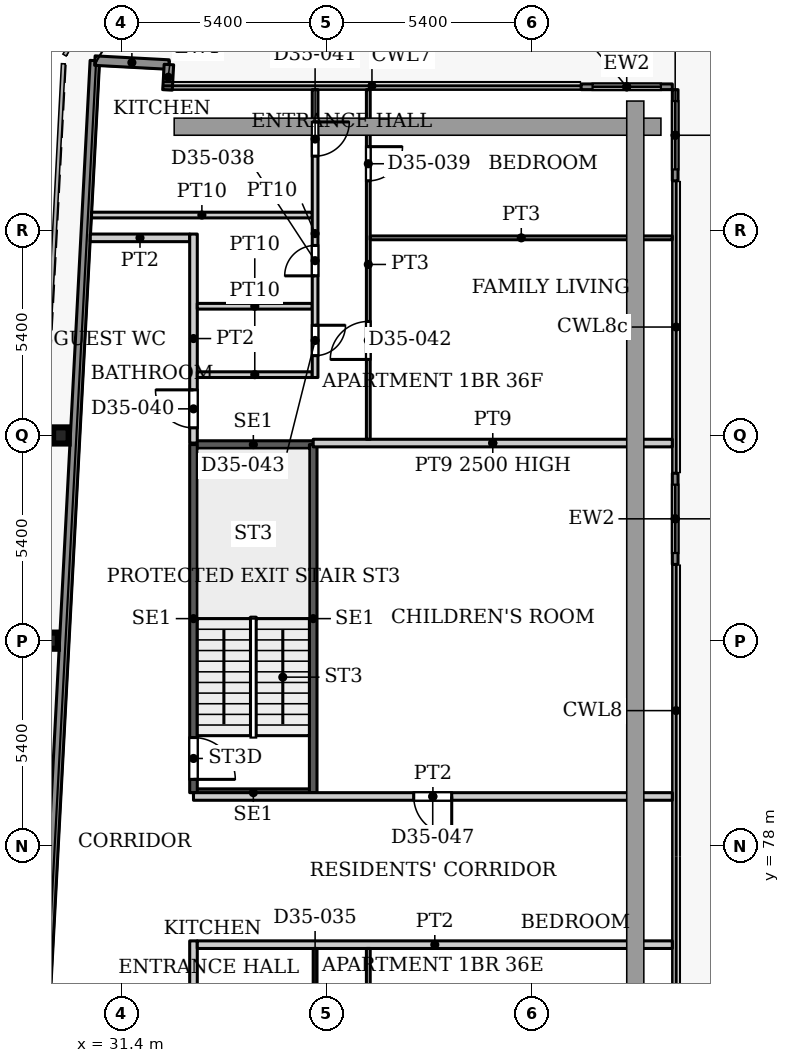
"""IFC4 building model, lengths in metres.
Left out: names, types, materials, properties, quantities, classifications, styles, units other than length and angle.
Written with IfcOpenShell. Run it as: python <this file> out.ifc"""

import sys

from ifc_helpers import new_model, si_unit, direction, frame, frame_2d, origin, origin_2d, place, context, subcontext, project, spatial, rectangle, i_section, extrude, source, transform, mapped, element, fill, save


model = new_model("IFC4")
c1 = context("Model", 3, precision=1e-05, world=origin(), true_north=direction((0.0, 1.0)))
c2 = subcontext(c1, "Body", "Model", "MODEL_VIEW")
j1 = project(units=[si_unit("LENGTHUNIT", "METRE"), si_unit("PLANEANGLEUNIT", "RADIAN")], contexts=[c1])
p1 = place(None, origin())
s1 = spatial("IfcSite", under=j1, at=p1, CompositionType="ELEMENT")
p2 = place(p1, origin())
s2 = spatial("IfcBuilding", under=s1, at=p2, CompositionType="ELEMENT")
p3 = place(p2, frame((0.0, 0.0, 156.5)))
s3 = spatial("IfcBuildingStorey", under=s2, at=p3, CompositionType="ELEMENT", Elevation=156.5)
for number, where, z_axis, x_axis in (
    (1, (29.527, 83.4, 0.0), (0.0, 0.0, 1.0), (1.0, 0.0, 0.0)),
    (2, (29.811, 88.8, 0.0), (0.0, 0.0, 1.0), (1.0, 0.0, 0.0)),
):
    element("IfcColumn", number, at=place(p3, frame(where, z_axis=z_axis, x_axis=x_axis)), inside=s3, PredefinedType="COLUMN", context=c2, shape_type="SweptSolid", body=[
        extrude(i_section(OverallWidth=0.409, OverallDepth=0.425, WebThickness=0.033, FlangeThickness=0.052, FilletRadius=0.013, at=origin_2d()), origin(), (0.0, 0.0, 1.0), 3.9),
    ])
p4 = place(p3, frame((27.195, 31.969, 0.0), z_axis=(0.0, 0.0, 1.0), x_axis=(0.052554995867, 0.998618031286, 0.0)))
e3 = element("IfcWall", 3, at=p4, inside=s3, PredefinedType="SOLIDWALL", context=c2, shape_type="SweptSolid", body=[
    extrude(rectangle(XDim=66.787, YDim=0.25, at=frame_2d((33.394, 0.0))), origin(), (0.0, 0.0, 1.0), 3.75),
])
p5 = place(p3, frame((30.705, 98.664, 0.0), z_axis=(0.0, 0.0, 1.0), x_axis=(0.998577785791, -0.053314216913, 0.0)))
e4 = element("IfcWall", 4, at=p5, inside=s3, PredefinedType="SOLIDWALL", context=c2, shape_type="SweptSolid", body=[
    extrude(rectangle(XDim=1.951, YDim=0.25, at=frame_2d((0.975, 0.0))), origin(), (0.0, 0.0, 1.0), 3.75),
])
p6 = place(p3, frame((32.653, 98.56, 0.0), z_axis=(0.0, 0.0, 1.0), x_axis=(-0.054093451632, -0.998535877418, 0.0)))
e5 = element("IfcWall", 5, at=p6, inside=s3, PredefinedType="SOLIDWALL", context=c2, shape_type="SweptSolid", body=[
    extrude(rectangle(XDim=0.668, YDim=0.25, at=frame_2d((0.334, 0.0))), origin(), (0.0, 0.0, 1.0), 3.75),
])
p7 = place(p3, frame((43.5, 97.975, 0.0), z_axis=(0.0, 0.0, 1.0), x_axis=(1.0, 0.0, 0.0)))
e6 = element("IfcWall", 6, at=p7, inside=s3, PredefinedType="SOLIDWALL", context=c2, shape_type="SweptSolid", body=[
    extrude(rectangle(XDim=2.4, YDim=0.15, at=frame_2d((1.2, 0.0))), origin(), (0.0, 0.0, 1.0), 3.75),
])
p8 = place(p7, frame((0.3, 0.0, 0.0)))
e7 = element("IfcOpeningElement", 7, at=p8, cuts=e6, PredefinedType="OPENING", context=c2, shape_type="SweptSolid", body=[
    extrude(rectangle(XDim=1.8, YDim=2.4, at=frame_2d((0.9, 1.2))), frame((0.0, 0.085, 0.0), z_axis=(0.0, -1.0, 0.0), x_axis=(1.0, 0.0, 0.0)), (0.0, 0.0, 1.0), 0.17),
])
p9 = place(p3, frame((45.975, 97.9, 0.0), z_axis=(0.0, 0.0, 1.0), x_axis=(0.0, -1.0, 0.0)))
e8 = element("IfcWall", 8, at=p9, inside=s3, PredefinedType="SOLIDWALL", context=c2, shape_type="SweptSolid", body=[
    extrude(rectangle(XDim=2.4, YDim=0.15, at=frame_2d((1.2, 0.0))), origin(), (0.0, 0.0, 1.0), 3.75),
])
p10 = place(p9, frame((0.3, 0.0, 0.0)))
e9 = element("IfcOpeningElement", 9, at=p10, cuts=e8, PredefinedType="OPENING", context=c2, shape_type="SweptSolid", body=[
    extrude(rectangle(XDim=1.8, YDim=2.4, at=frame_2d((0.9, 1.2))), frame((0.0, 0.085, 0.0), z_axis=(0.0, -1.0, 0.0), x_axis=(1.0, 0.0, 0.0)), (0.0, 0.0, 1.0), 0.17),
])
p11 = place(p3, frame((45.975, 87.806, 0.0), z_axis=(0.0, 0.0, 1.0), x_axis=(0.0, -1.0, 0.0)))
e10 = element("IfcWall", 10, at=p11, inside=s3, PredefinedType="SOLIDWALL", context=c2, shape_type="SweptSolid", body=[
    extrude(rectangle(XDim=2.4, YDim=0.15, at=frame_2d((1.2, 0.0))), origin(), (0.0, 0.0, 1.0), 3.75),
])
p12 = place(p11, frame((0.3, 0.0, 0.0)))
e11 = element("IfcOpeningElement", 11, at=p12, cuts=e10, PredefinedType="OPENING", context=c2, shape_type="SweptSolid", body=[
    extrude(rectangle(XDim=1.8, YDim=2.4, at=frame_2d((0.9, 1.2))), frame((0.0, 0.085, 0.0), z_axis=(0.0, -1.0, 0.0), x_axis=(1.0, 0.0, 0.0)), (0.0, 0.0, 1.0), 0.17),
])
for number, where, z_axis, x_axis in (
    (12, (33.3, 79.4, 0.0), (0.0, 0.0, 1.0), (1.0, 0.0, 0.0)),
    (13, (33.3, 88.56, 0.0), (0.0, 0.0, 1.0), (1.0, 0.0, 0.0)),
):
    element("IfcWall", number, at=place(p3, frame(where, z_axis=z_axis, x_axis=x_axis)), inside=s3, PredefinedType="SHEAR", context=c2, shape_type="SweptSolid", body=[
        extrude(rectangle(XDim=3.15, YDim=0.2, at=frame_2d((1.575, 0.0))), origin(), (0.0, 0.0, 1.0), 3.9),
    ])
p13 = place(p3, frame((33.3, 79.4, 0.0), z_axis=(0.0, 0.0, 1.0), x_axis=(0.0, 1.0, 0.0)))
e14 = element("IfcWall", 14, at=p13, inside=s3, PredefinedType="SHEAR", context=c2, shape_type="SweptSolid", body=[
    extrude(rectangle(XDim=9.16, YDim=0.2, at=frame_2d((4.58, 0.0))), origin(), (0.0, 0.0, 1.0), 3.9),
])
p14 = place(p13, frame((0.35, 0.0, 0.0)))
e15 = element("IfcOpeningElement", 15, at=p14, cuts=e14, PredefinedType="OPENING", context=c2, shape_type="SweptSolid", body=[
    extrude(rectangle(XDim=1.1, YDim=2.2, at=frame_2d((0.55, 1.1))), frame((0.0, 0.11, 0.0), z_axis=(0.0, -1.0, 0.0), x_axis=(1.0, 0.0, 0.0)), (0.0, 0.0, 1.0), 0.22),
])
p15 = place(p3, frame((36.45, 79.4, 0.0), z_axis=(0.0, 0.0, 1.0), x_axis=(0.0, 1.0, 0.0)))
e16 = element("IfcWall", 16, at=p15, inside=s3, PredefinedType="SHEAR", context=c2, shape_type="SweptSolid", body=[
    extrude(rectangle(XDim=9.16, YDim=0.2, at=frame_2d((4.58, 0.0))), origin(), (0.0, 0.0, 1.0), 3.9),
])
p16 = place(p3, frame((30.617, 94.6, 0.0), z_axis=(0.0, 0.0, 1.0), x_axis=(1.0, 0.0, 0.0)))
e17 = element("IfcWall", 17, at=p16, inside=s3, PredefinedType="PARTITIONING", context=c2, shape_type="SweptSolid", body=[
    extrude(rectangle(XDim=5.808, YDim=0.15, at=frame_2d((2.904, 0.0))), origin(), (0.0, 0.0, 1.0), 3.6),
])
p17 = place(p3, frame((30.585, 94.0, 0.0), z_axis=(0.0, 0.0, 1.0), x_axis=(1.0, 0.0, 0.0)))
e18 = element("IfcWall", 18, at=p17, inside=s3, PredefinedType="PARTITIONING", context=c2, shape_type="SweptSolid", body=[
    extrude(rectangle(XDim=2.615, YDim=0.2, at=frame_2d((1.308, 0.0))), origin(), (0.0, 0.0, 1.0), 3.6),
])
p18 = place(p3, frame((33.3, 57.9, 0.0), z_axis=(0.0, 0.0, 1.0), x_axis=(0.0, 1.0, 0.0)))
e19 = element("IfcWall", 19, at=p18, inside=s3, PredefinedType="PARTITIONING", context=c2, shape_type="SweptSolid", body=[
    extrude(rectangle(XDim=17.6, YDim=0.2, at=frame_2d((8.8, 0.0))), origin(), (0.0, 0.0, 1.0), 3.6),
])
p19 = place(p18, frame((7.4, 0.0, 0.0)))
e20 = element("IfcOpeningElement", 20, at=p19, cuts=e19, PredefinedType="OPENING", context=c2, shape_type="SweptSolid", body=[
    extrude(rectangle(XDim=1.0, YDim=2.1, at=frame_2d((0.5, 1.05))), frame((0.0, 0.11, 0.0), z_axis=(0.0, -1.0, 0.0), x_axis=(1.0, 0.0, 0.0)), (0.0, 0.0, 1.0), 0.22),
])
p20 = place(p18, frame((13.1, 0.0, 0.0)))
e21 = element("IfcOpeningElement", 21, at=p20, cuts=e19, PredefinedType="OPENING", context=c2, shape_type="SweptSolid", body=[
    extrude(rectangle(XDim=1.0, YDim=2.1, at=frame_2d((0.5, 1.05))), frame((0.0, 0.11, 0.0), z_axis=(0.0, -1.0, 0.0), x_axis=(1.0, 0.0, 0.0)), (0.0, 0.0, 1.0), 0.22),
])
p21 = place(p3, frame((33.3, 79.3, 0.0), z_axis=(0.0, 0.0, 1.0), x_axis=(1.0, 0.0, 0.0)))
e22 = element("IfcWall", 22, at=p21, inside=s3, PredefinedType="PARTITIONING", context=c2, shape_type="SweptSolid", body=[
    extrude(rectangle(XDim=12.6, YDim=0.2, at=frame_2d((6.3, 0.0))), origin(), (0.0, 0.0, 1.0), 3.6),
])
p22 = place(p21, frame((5.795, 0.0, 0.0)))
e23 = element("IfcOpeningElement", 23, at=p22, cuts=e22, PredefinedType="OPENING", context=c2, shape_type="SweptSolid", body=[
    extrude(rectangle(XDim=1.0, YDim=2.1, at=frame_2d((0.5, 1.05))), frame((0.0, 0.11, 0.0), z_axis=(0.0, -1.0, 0.0), x_axis=(1.0, 0.0, 0.0)), (0.0, 0.0, 1.0), 0.22),
])
p23 = place(p3, frame((33.3, 88.6, 0.0), z_axis=(0.0, 0.0, 1.0), x_axis=(0.0, 1.0, 0.0)))
e24 = element("IfcWall", 24, at=p23, inside=s3, PredefinedType="PARTITIONING", context=c2, shape_type="SweptSolid", body=[
    extrude(rectangle(XDim=5.5, YDim=0.2, at=frame_2d((2.75, 0.0))), origin(), (0.0, 0.0, 1.0), 3.6),
])
p24 = place(p23, frame((0.4, 0.0, 0.0)))
e25 = element("IfcOpeningElement", 25, at=p24, cuts=e24, PredefinedType="OPENING", context=c2, shape_type="SweptSolid", body=[
    extrude(rectangle(XDim=1.0, YDim=2.1, at=frame_2d((0.5, 1.05))), frame((0.0, 0.11, 0.0), z_axis=(0.0, -1.0, 0.0), x_axis=(1.0, 0.0, 0.0)), (0.0, 0.0, 1.0), 0.22),
])
p25 = place(p3, frame((33.4, 75.4, 0.0), z_axis=(0.0, 0.0, 1.0), x_axis=(1.0, 0.0, 0.0)))
e26 = element("IfcWall", 26, at=p25, inside=s3, PredefinedType="PARTITIONING", context=c2, shape_type="SweptSolid", body=[
    extrude(rectangle(XDim=12.5, YDim=0.2, at=frame_2d((6.25, 0.0))), origin(), (0.0, 0.0, 1.0), 3.6),
])
for number, where, z_axis, x_axis in (
    (27, (33.4, 90.4, 0.0), (0.0, 0.0, 1.0), (1.0, 0.0, 0.0)),
    (28, (33.4, 92.2, 0.0), (0.0, 0.0, 1.0), (1.0, 0.0, 0.0)),
):
    element("IfcWall", number, at=place(p3, frame(where, z_axis=z_axis, x_axis=x_axis)), inside=s3, PredefinedType="PARTITIONING", context=c2, shape_type="SweptSolid", body=[
        extrude(rectangle(XDim=3.025, YDim=0.15, at=frame_2d((1.513, 0.0))), origin(), (0.0, 0.0, 1.0), 3.6),
    ])
p26 = place(p3, frame((36.5, 72.45, 0.0), z_axis=(0.0, 0.0, 1.0), x_axis=(0.0, 1.0, 0.0)))
e29 = element("IfcWall", 29, at=p26, inside=s3, PredefinedType="PARTITIONING", context=c2, shape_type="SweptSolid", body=[
    extrude(rectangle(XDim=2.85, YDim=0.1, at=frame_2d((1.425, 0.0))), origin(), (0.0, 0.0, 1.0), 3.6),
])
p27 = place(p26, frame((1.0, 0.0, 0.0)))
e30 = element("IfcOpeningElement", 30, at=p27, cuts=e29, PredefinedType="OPENING", context=c2, shape_type="SweptSolid", body=[
    extrude(rectangle(XDim=0.9, YDim=2.1, at=frame_2d((0.45, 1.05))), frame((0.0, 0.06, 0.0), z_axis=(0.0, -1.0, 0.0), x_axis=(1.0, 0.0, 0.0)), (0.0, 0.0, 1.0), 0.12),
])
p28 = place(p3, frame((36.45, 88.6, 0.0), z_axis=(0.0, 0.0, 1.0), x_axis=(1.0, 0.0, 0.0)))
e31 = element("IfcWall", 31, at=p28, inside=s3, PredefinedType="PARTITIONING", context=c2, shape_type="SweptSolid", body=[
    extrude(rectangle(XDim=9.45, YDim=0.2, at=frame_2d((4.725, 0.0))), origin(), (0.0, 0.0, 1.0), 2.5),
])
p29 = place(p3, frame((36.5, 90.325, 0.0), z_axis=(0.0, 0.0, 1.0), x_axis=(0.0, 1.0, 0.0)))
e32 = element("IfcWall", 32, at=p29, inside=s3, PredefinedType="PARTITIONING", context=c2, shape_type="SweptSolid", body=[
    extrude(rectangle(XDim=7.575, YDim=0.15, at=frame_2d((3.788, 0.0))), origin(), (0.0, 0.0, 1.0), 3.6),
])
p30 = place(p29, frame((2.675, 0.0, 0.0)))
e33 = element("IfcOpeningElement", 33, at=p30, cuts=e32, PredefinedType="OPENING", context=c2, shape_type="SweptSolid", body=[
    extrude(rectangle(XDim=0.8, YDim=2.1, at=frame_2d((0.4, 1.05))), frame((0.0, 0.085, 0.0), z_axis=(0.0, -1.0, 0.0), x_axis=(1.0, 0.0, 0.0)), (0.0, 0.0, 1.0), 0.17),
])
p31 = place(p29, frame((5.825, 0.0, 0.0)))
e34 = element("IfcOpeningElement", 34, at=p31, cuts=e32, PredefinedType="OPENING", context=c2, shape_type="SweptSolid", body=[
    extrude(rectangle(XDim=0.9, YDim=2.1, at=frame_2d((0.45, 1.05))), frame((0.0, 0.085, 0.0), z_axis=(0.0, -1.0, 0.0), x_axis=(1.0, 0.0, 0.0)), (0.0, 0.0, 1.0), 0.17),
])
p32 = place(p29, frame((0.575, 0.0, 0.0)))
e35 = element("IfcOpeningElement", 35, at=p32, cuts=e32, PredefinedType="OPENING", context=c2, shape_type="SweptSolid", body=[
    extrude(rectangle(XDim=0.8, YDim=2.1, at=frame_2d((0.4, 1.05))), frame((0.0, 0.085, 0.0), z_axis=(0.0, -1.0, 0.0), x_axis=(1.0, 0.0, 0.0)), (0.0, 0.0, 1.0), 0.17),
])
p33 = place(p3, frame((37.9, 66.8, 0.0), z_axis=(0.0, 0.0, 1.0), x_axis=(0.0, 1.0, 0.0)))
e36 = element("IfcWall", 36, at=p33, inside=s3, PredefinedType="PARTITIONING", context=c2, shape_type="SweptSolid", body=[
    extrude(rectangle(XDim=8.5, YDim=0.1, at=frame_2d((4.25, 0.0))), origin(), (0.0, 0.0, 1.0), 3.6),
])
p34 = place(p33, frame((6.2, 0.0, 0.0)))
e37 = element("IfcOpeningElement", 37, at=p34, cuts=e36, PredefinedType="OPENING", context=c2, shape_type="SweptSolid", body=[
    extrude(rectangle(XDim=0.9, YDim=2.1, at=frame_2d((0.45, 1.05))), frame((0.0, 0.06, 0.0), z_axis=(0.0, -1.0, 0.0), x_axis=(1.0, 0.0, 0.0)), (0.0, 0.0, 1.0), 0.12),
])
p35 = place(p33, frame((1.8, 0.0, 0.0)))
e38 = element("IfcOpeningElement", 38, at=p35, cuts=e36, PredefinedType="OPENING", context=c2, shape_type="SweptSolid", body=[
    extrude(rectangle(XDim=1.0, YDim=2.1, at=frame_2d((0.5, 1.05))), frame((0.0, 0.06, 0.0), z_axis=(0.0, -1.0, 0.0), x_axis=(1.0, 0.0, 0.0)), (0.0, 0.0, 1.0), 0.12),
])
p36 = place(p3, frame((37.9, 88.7, 0.0), z_axis=(0.0, 0.0, 1.0), x_axis=(0.0, 1.0, 0.0)))
e39 = element("IfcWall", 39, at=p36, inside=s3, PredefinedType="PARTITIONING", context=c2, shape_type="SweptSolid", body=[
    extrude(rectangle(XDim=9.2, YDim=0.1, at=frame_2d((4.6, 0.0))), origin(), (0.0, 0.0, 1.0), 3.6),
])
p37 = place(p36, frame((6.8, 0.0, 0.0)))
e40 = element("IfcOpeningElement", 40, at=p37, cuts=e39, PredefinedType="OPENING", context=c2, shape_type="SweptSolid", body=[
    extrude(rectangle(XDim=0.9, YDim=2.1, at=frame_2d((0.45, 1.05))), frame((0.0, 0.06, 0.0), z_axis=(0.0, -1.0, 0.0), x_axis=(1.0, 0.0, 0.0)), (0.0, 0.0, 1.0), 0.12),
])
p38 = place(p36, frame((2.1, 0.0, 0.0)))
e41 = element("IfcOpeningElement", 41, at=p38, cuts=e39, PredefinedType="OPENING", context=c2, shape_type="SweptSolid", body=[
    extrude(rectangle(XDim=1.0, YDim=2.1, at=frame_2d((0.5, 1.05))), frame((0.0, 0.06, 0.0), z_axis=(0.0, -1.0, 0.0), x_axis=(1.0, 0.0, 0.0)), (0.0, 0.0, 1.0), 0.12),
])
p39 = place(p3, frame((37.95, 94.0, 0.0), z_axis=(0.0, 0.0, 1.0), x_axis=(1.0, 0.0, 0.0)))
e42 = element("IfcWall", 42, at=p39, inside=s3, PredefinedType="PARTITIONING", context=c2, shape_type="SweptSolid", body=[
    extrude(rectangle(XDim=7.95, YDim=0.1, at=frame_2d((3.975, 0.0))), origin(), (0.0, 0.0, 1.0), 3.6),
])
m1 = source(origin(), c2, "Body", "SweptSolid", [
    extrude(rectangle(XDim=1.8, YDim=2.4, at=frame_2d((0.9, 1.2))), frame((0.0, 0.025, 0.0), z_axis=(0.0, -1.0, 0.0), x_axis=(1.0, 0.0, 0.0)), (0.0, 0.0, 1.0), 0.05),
])
p40 = place(p8, origin())
e43 = element("IfcDoor", 43, at=p40, inside=s3, OperationType="SLIDING_TO_LEFT", PredefinedType="DOOR", context=c2, shape_type="MappedRepresentation", body=[
    mapped(m1, transform((0.0, 0.0, 0.0), x_axis=(1.0, 0.0, 0.0), y_axis=(0.0, 1.0, 0.0), z_axis=(0.0, 0.0, 1.0), scale=1.0)),
])
fill(e7, e43)
p41 = place(p10, origin())
e44 = element("IfcDoor", 44, at=p41, inside=s3, OperationType="SLIDING_TO_LEFT", PredefinedType="DOOR", context=c2, shape_type="MappedRepresentation", body=[
    mapped(m1, transform((0.0, 0.0, 0.0), x_axis=(1.0, 0.0, 0.0), y_axis=(0.0, 1.0, 0.0), z_axis=(0.0, 0.0, 1.0), scale=1.0)),
])
fill(e9, e44)
p42 = place(p12, origin())
e45 = element("IfcDoor", 45, at=p42, inside=s3, OperationType="SLIDING_TO_LEFT", PredefinedType="DOOR", context=c2, shape_type="MappedRepresentation", body=[
    mapped(m1, transform((0.0, 0.0, 0.0), x_axis=(1.0, 0.0, 0.0), y_axis=(0.0, 1.0, 0.0), z_axis=(0.0, 0.0, 1.0), scale=1.0)),
])
fill(e11, e45)
m2 = source(origin(), c2, "Body", "SweptSolid", [
    extrude(rectangle(XDim=1.1, YDim=2.2, at=frame_2d((0.55, 1.1))), frame((0.0, 0.025, 0.0), z_axis=(0.0, -1.0, 0.0), x_axis=(1.0, 0.0, 0.0)), (0.0, 0.0, 1.0), 0.05),
])
p43 = place(p14, origin())
e46 = element("IfcDoor", 46, at=p43, inside=s3, OperationType="SINGLE_SWING_RIGHT", PredefinedType="DOOR", context=c2, shape_type="MappedRepresentation", body=[
    mapped(m2, transform((0.0, 0.0, 0.0), x_axis=(1.0, 0.0, 0.0), y_axis=(0.0, 1.0, 0.0), z_axis=(0.0, 0.0, 1.0), scale=1.0)),
])
fill(e15, e46)
m3 = source(origin(), c2, "Body", "SweptSolid", [
    extrude(rectangle(XDim=0.8, YDim=2.1, at=frame_2d((0.4, 1.05))), frame((0.0, 0.025, 0.0), z_axis=(0.0, -1.0, 0.0), x_axis=(1.0, 0.0, 0.0)), (0.0, 0.0, 1.0), 0.05),
])
p44 = place(p30, origin())
e47 = element("IfcDoor", 47, at=p44, inside=s3, OperationType="SINGLE_SWING_LEFT", PredefinedType="DOOR", context=c2, shape_type="MappedRepresentation", body=[
    mapped(m3, transform((0.0, 0.0, 0.0), x_axis=(1.0, 0.0, 0.0), y_axis=(0.0, 1.0, 0.0), z_axis=(0.0, 0.0, 1.0), scale=1.0)),
])
fill(e33, e47)
m4 = source(origin(), c2, "Body", "SweptSolid", [
    extrude(rectangle(XDim=0.9, YDim=2.1, at=frame_2d((0.45, 1.05))), frame((0.0, 0.025, 0.0), z_axis=(0.0, -1.0, 0.0), x_axis=(1.0, 0.0, 0.0)), (0.0, 0.0, 1.0), 0.05),
])
p45 = place(p37, origin())
e48 = element("IfcDoor", 48, at=p45, inside=s3, OperationType="SINGLE_SWING_RIGHT", PredefinedType="DOOR", context=c2, shape_type="MappedRepresentation", body=[
    mapped(m4, transform((0.0, 0.0, 0.0), x_axis=(1.0, 0.0, 0.0), y_axis=(0.0, 1.0, 0.0), z_axis=(0.0, 0.0, 1.0), scale=1.0)),
])
fill(e40, e48)
m5 = source(origin(), c2, "Body", "SweptSolid", [
    extrude(rectangle(XDim=1.0, YDim=2.1, at=frame_2d((0.5, 1.05))), frame((0.0, 0.025, 0.0), z_axis=(0.0, -1.0, 0.0), x_axis=(1.0, 0.0, 0.0)), (0.0, 0.0, 1.0), 0.05),
])
p46 = place(p24, origin())
e49 = element("IfcDoor", 49, at=p46, inside=s3, OperationType="SINGLE_SWING_LEFT", PredefinedType="DOOR", context=c2, shape_type="MappedRepresentation", body=[
    mapped(m5, transform((0.0, 0.0, 0.0), x_axis=(1.0, 0.0, 0.0), y_axis=(0.0, 1.0, 0.0), z_axis=(0.0, 0.0, 1.0), scale=1.0)),
])
fill(e25, e49)
p47 = place(p31, origin())
e50 = element("IfcDoor", 50, at=p47, inside=s3, OperationType="SINGLE_SWING_RIGHT", PredefinedType="DOOR", context=c2, shape_type="MappedRepresentation", body=[
    mapped(m4, transform((0.0, 0.0, 0.0), x_axis=(1.0, 0.0, 0.0), y_axis=(0.0, 1.0, 0.0), z_axis=(0.0, 0.0, 1.0), scale=1.0)),
])
fill(e34, e50)
m6 = source(origin(), c2, "Body", "SweptSolid", [
    extrude(rectangle(XDim=1.0, YDim=2.1, at=frame_2d((0.5, 1.05))), frame((0.0, 0.025, 0.0), z_axis=(0.0, -1.0, 0.0), x_axis=(1.0, 0.0, 0.0)), (0.0, 0.0, 1.0), 0.05),
])
p48 = place(p38, origin())
e51 = element("IfcDoor", 51, at=p48, inside=s3, OperationType="SINGLE_SWING_LEFT", PredefinedType="DOOR", context=c2, shape_type="MappedRepresentation", body=[
    mapped(m6, transform((0.0, 0.0, 0.0), x_axis=(1.0, 0.0, 0.0), y_axis=(0.0, 1.0, 0.0), z_axis=(0.0, 0.0, 1.0), scale=1.0)),
])
fill(e41, e51)
p49 = place(p32, origin())
e52 = element("IfcDoor", 52, at=p49, inside=s3, OperationType="SINGLE_SWING_RIGHT", PredefinedType="DOOR", context=c2, shape_type="MappedRepresentation", body=[
    mapped(m3, transform((0.0, 0.0, 0.0), x_axis=(1.0, 0.0, 0.0), y_axis=(0.0, 1.0, 0.0), z_axis=(0.0, 0.0, 1.0), scale=1.0)),
])
fill(e35, e52)
m7 = source(origin(), c2, "Body", "SweptSolid", [
    extrude(rectangle(XDim=1.0, YDim=2.1, at=frame_2d((0.5, 1.05))), frame((0.0, 0.025, 0.0), z_axis=(0.0, -1.0, 0.0), x_axis=(1.0, 0.0, 0.0)), (0.0, 0.0, 1.0), 0.05),
])
p50 = place(p22, origin())
e53 = element("IfcDoor", 53, at=p50, inside=s3, OperationType="SINGLE_SWING_RIGHT", PredefinedType="DOOR", context=c2, shape_type="MappedRepresentation", body=[
    mapped(m7, transform((0.0, 0.0, 0.0), x_axis=(1.0, 0.0, 0.0), y_axis=(0.0, 1.0, 0.0), z_axis=(0.0, 0.0, 1.0), scale=1.0)),
])
fill(e23, e53)
save(model, sys.argv[1])
